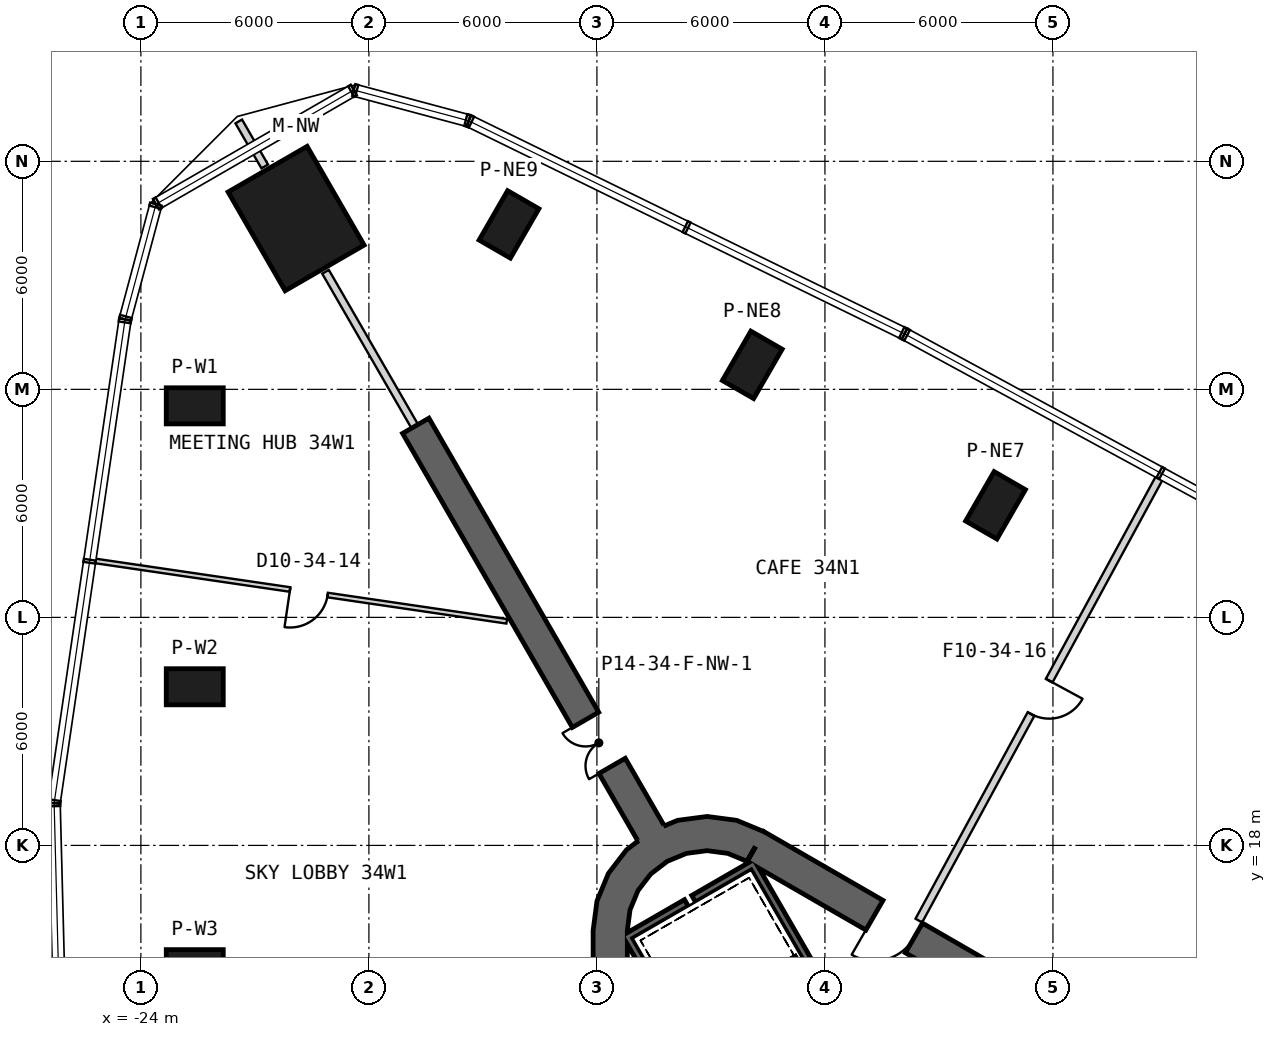
"""IFC4 building model, lengths in metres.
Left out: names, types, materials, properties, quantities, classifications, styles, units other than length and angle.
Written with IfcOpenShell. Run it as: python <this file> out.ifc"""

import sys

from ifc_helpers import new_model, si_unit, direction, frame, frame_2d, origin, origin_2d, place, context, subcontext, project, spatial, polyline, rectangle, outline, extrude, element, fill, save


model = new_model("IFC4")
c1 = context("Model", 3, precision=1e-05, world=origin(), true_north=direction((0.0, 1.0)))
c2 = subcontext(c1, "Body", "Model", "MODEL_VIEW")
j1 = project(units=[si_unit("LENGTHUNIT", "METRE"), si_unit("PLANEANGLEUNIT", "RADIAN")], contexts=[c1])
p1 = place(None, origin())
s1 = spatial("IfcSite", under=j1, at=p1, CompositionType="ELEMENT")
p2 = place(p1, origin())
s2 = spatial("IfcBuilding", under=s1, at=p2, CompositionType="ELEMENT")
p3 = place(p2, frame((0.0, 0.0, 156.2)))
s3 = spatial("IfcBuildingStorey", under=s2, at=p3, CompositionType="ELEMENT", Elevation=156.2)
p4 = place(p3, frame((-19.915, 34.494, 0.0), z_axis=(0.0, 0.0, 1.0), x_axis=(-0.5, 0.866025403784, 0.0)))
e1 = element("IfcColumn", 1, at=p4, inside=s3, PredefinedType="COLUMN", context=c2, shape_type="SweptSolid", body=[
    extrude(rectangle(XDim=3.0, YDim=2.4, at=origin_2d()), origin(), (0.0, 0.0, 1.0), 7.0),
])
for number, where, z_axis, x_axis in (
    (2, (-22.583, 29.566, 0.0), (0.0, 0.0, 1.0), (-1.0, 0.0, 0.0)),
    (3, (-22.583, 22.174, 0.0), (0.0, 0.0, 1.0), (-1.0, 0.0, 0.0)),
    (4, (-22.583, 14.783, 0.0), (0.0, 0.0, 1.0), (-1.0, 0.0, 0.0)),
    (5, (-1.511, 26.948, 0.0), (0.0, 0.0, 1.0), (0.5, 0.866, 0.0)),
    (6, (-7.912, 30.644, 0.0), (0.0, 0.0, 1.0), (0.5, 0.866, 0.0)),
    (7, (-14.313, 34.34, 0.0), (0.0, 0.0, 1.0), (0.5, 0.866, 0.0)),
):
    element("IfcColumn", number, at=place(p3, frame(where, z_axis=z_axis, x_axis=x_axis)), inside=s3, PredefinedType="COLUMN", context=c2, shape_type="SweptSolid", body=[
        extrude(rectangle(XDim=1.5, YDim=0.95, at=origin_2d()), origin(), (0.0, 0.0, 1.0), 7.0),
    ])
p5 = place(p3, frame((19.475, 2.208, 0.0), z_axis=(0.0, 0.0, 1.0), x_axis=(-0.866028369851, 0.499994862586, 0.0)))
e8 = element("IfcWall", 8, at=p5, inside=s3, PredefinedType="SHEAR", context=c2, shape_type="SweptSolid", body=[
    extrude(rectangle(XDim=31.523, YDim=0.9, at=frame_2d((15.762, 0.0))), origin(), (0.0, 0.0, 1.0), 7.0),
])
p6 = place(p5, frame((7.062, 0.0, 0.0)))
e9 = element("IfcOpeningElement", 9, at=p6, cuts=e8, PredefinedType="OPENING", context=c2, shape_type="SweptSolid", body=[
    extrude(rectangle(XDim=1.2, YDim=2.4, at=frame_2d((0.6, 1.2))), frame((0.0, 0.46, 0.0), z_axis=(0.0, -1.0, 0.0), x_axis=(1.0, 0.0, 0.0)), (0.0, 0.0, 1.0), 0.92),
])
p7 = place(p5, frame((15.162, 0.0, 0.0)))
e10 = element("IfcOpeningElement", 10, at=p7, cuts=e8, PredefinedType="OPENING", context=c2, shape_type="SweptSolid", body=[
    extrude(rectangle(XDim=1.2, YDim=2.4, at=frame_2d((0.6, 1.2))), frame((0.0, 0.46, 0.0), z_axis=(0.0, -1.0, 0.0), x_axis=(1.0, 0.0, 0.0)), (0.0, 0.0, 1.0), 0.92),
])
p8 = place(p5, frame((17.862, 0.0, 0.0)))
e11 = element("IfcOpeningElement", 11, at=p8, cuts=e8, PredefinedType="OPENING", context=c2, shape_type="SweptSolid", body=[
    extrude(rectangle(XDim=1.2, YDim=2.4, at=frame_2d((0.6, 1.2))), frame((0.0, 0.46, 0.0), z_axis=(0.0, -1.0, 0.0), x_axis=(1.0, 0.0, 0.0)), (0.0, 0.0, 1.0), 0.92),
])
p9 = place(p5, frame((20.562, 0.0, 0.0)))
e12 = element("IfcOpeningElement", 12, at=p9, cuts=e8, PredefinedType="OPENING", context=c2, shape_type="SweptSolid", body=[
    extrude(rectangle(XDim=1.2, YDim=2.4, at=frame_2d((0.6, 1.2))), frame((0.0, 0.46, 0.0), z_axis=(0.0, -1.0, 0.0), x_axis=(1.0, 0.0, 0.0)), (0.0, 0.0, 1.0), 0.92),
])
p10 = place(p5, frame((23.262, 0.0, 0.0)))
e13 = element("IfcOpeningElement", 13, at=p10, cuts=e8, PredefinedType="OPENING", context=c2, shape_type="SweptSolid", body=[
    extrude(rectangle(XDim=1.2, YDim=2.4, at=frame_2d((0.6, 1.2))), frame((0.0, 0.46, 0.0), z_axis=(0.0, -1.0, 0.0), x_axis=(1.0, 0.0, 0.0)), (0.0, 0.0, 1.0), 0.92),
])
p11 = place(p5, frame((3.612, 0.0, 0.0)))
e14 = element("IfcOpeningElement", 14, at=p11, cuts=e8, PredefinedType="OPENING", context=c2, shape_type="SweptSolid", body=[
    extrude(rectangle(XDim=1.2, YDim=2.4, at=frame_2d((0.6, 1.2))), frame((0.0, 0.46, 0.0), z_axis=(0.0, -1.0, 0.0), x_axis=(1.0, 0.0, 0.0)), (0.0, 0.0, 1.0), 0.92),
])
p12 = place(p5, frame((26.712, 0.0, 0.0)))
e15 = element("IfcOpeningElement", 15, at=p12, cuts=e8, PredefinedType="OPENING", context=c2, shape_type="SweptSolid", body=[
    extrude(rectangle(XDim=1.2, YDim=2.4, at=frame_2d((0.6, 1.2))), frame((0.0, 0.46, 0.0), z_axis=(0.0, -1.0, 0.0), x_axis=(1.0, 0.0, 0.0)), (0.0, 0.0, 1.0), 0.92),
])
p13 = place(p3, frame((-11.65, 15.762, 0.0), z_axis=(0.0, 0.0, 1.0), x_axis=(0.0, -1.0, 0.0)))
e16 = element("IfcWall", 16, at=p13, inside=s3, PredefinedType="SHEAR", context=c2, shape_type="SweptSolid", body=[
    extrude(rectangle(XDim=31.523, YDim=0.9, at=frame_2d((15.762, 0.0))), origin(), (0.0, 0.0, 1.0), 7.0),
])
p14 = place(p13, frame((7.062, 0.0, 0.0)))
e17 = element("IfcOpeningElement", 17, at=p14, cuts=e16, PredefinedType="OPENING", context=c2, shape_type="SweptSolid", body=[
    extrude(rectangle(XDim=1.2, YDim=2.4, at=frame_2d((0.6, 1.2))), frame((0.0, 0.46, 0.0), z_axis=(0.0, -1.0, 0.0), x_axis=(1.0, 0.0, 0.0)), (0.0, 0.0, 1.0), 0.92),
])
p15 = place(p13, frame((9.762, 0.0, 0.0)))
e18 = element("IfcOpeningElement", 18, at=p15, cuts=e16, PredefinedType="OPENING", context=c2, shape_type="SweptSolid", body=[
    extrude(rectangle(XDim=1.2, YDim=2.4, at=frame_2d((0.6, 1.2))), frame((0.0, 0.46, 0.0), z_axis=(0.0, -1.0, 0.0), x_axis=(1.0, 0.0, 0.0)), (0.0, 0.0, 1.0), 0.92),
])
p16 = place(p13, frame((12.462, 0.0, 0.0)))
e19 = element("IfcOpeningElement", 19, at=p16, cuts=e16, PredefinedType="OPENING", context=c2, shape_type="SweptSolid", body=[
    extrude(rectangle(XDim=1.2, YDim=2.4, at=frame_2d((0.6, 1.2))), frame((0.0, 0.46, 0.0), z_axis=(0.0, -1.0, 0.0), x_axis=(1.0, 0.0, 0.0)), (0.0, 0.0, 1.0), 0.92),
])
p17 = place(p13, frame((15.162, 0.0, 0.0)))
e20 = element("IfcOpeningElement", 20, at=p17, cuts=e16, PredefinedType="OPENING", context=c2, shape_type="SweptSolid", body=[
    extrude(rectangle(XDim=1.2, YDim=2.4, at=frame_2d((0.6, 1.2))), frame((0.0, 0.46, 0.0), z_axis=(0.0, -1.0, 0.0), x_axis=(1.0, 0.0, 0.0)), (0.0, 0.0, 1.0), 0.92),
])
p18 = place(p13, frame((17.862, 0.0, 0.0)))
e21 = element("IfcOpeningElement", 21, at=p18, cuts=e16, PredefinedType="OPENING", context=c2, shape_type="SweptSolid", body=[
    extrude(rectangle(XDim=1.2, YDim=2.4, at=frame_2d((0.6, 1.2))), frame((0.0, 0.46, 0.0), z_axis=(0.0, -1.0, 0.0), x_axis=(1.0, 0.0, 0.0)), (0.0, 0.0, 1.0), 0.92),
])
p19 = place(p13, frame((20.562, 0.0, 0.0)))
e22 = element("IfcOpeningElement", 22, at=p19, cuts=e16, PredefinedType="OPENING", context=c2, shape_type="SweptSolid", body=[
    extrude(rectangle(XDim=1.2, YDim=2.4, at=frame_2d((0.6, 1.2))), frame((0.0, 0.46, 0.0), z_axis=(0.0, -1.0, 0.0), x_axis=(1.0, 0.0, 0.0)), (0.0, 0.0, 1.0), 0.92),
])
p20 = place(p13, frame((23.262, 0.0, 0.0)))
e23 = element("IfcOpeningElement", 23, at=p20, cuts=e16, PredefinedType="OPENING", context=c2, shape_type="SweptSolid", body=[
    extrude(rectangle(XDim=1.2, YDim=2.4, at=frame_2d((0.6, 1.2))), frame((0.0, 0.46, 0.0), z_axis=(0.0, -1.0, 0.0), x_axis=(1.0, 0.0, 0.0)), (0.0, 0.0, 1.0), 0.92),
])
p21 = place(p13, frame((3.612, 0.0, 0.0)))
e24 = element("IfcOpeningElement", 24, at=p21, cuts=e16, PredefinedType="OPENING", context=c2, shape_type="SweptSolid", body=[
    extrude(rectangle(XDim=1.2, YDim=2.4, at=frame_2d((0.6, 1.2))), frame((0.0, 0.46, 0.0), z_axis=(0.0, -1.0, 0.0), x_axis=(1.0, 0.0, 0.0)), (0.0, 0.0, 1.0), 0.92),
])
p22 = place(p13, frame((26.712, 0.0, 0.0)))
e25 = element("IfcOpeningElement", 25, at=p22, cuts=e16, PredefinedType="OPENING", context=c2, shape_type="SweptSolid", body=[
    extrude(rectangle(XDim=1.2, YDim=2.4, at=frame_2d((0.6, 1.2))), frame((0.0, 0.46, 0.0), z_axis=(0.0, -1.0, 0.0), x_axis=(1.0, 0.0, 0.0)), (0.0, 0.0, 1.0), 0.92),
])
p23 = place(p3, origin())
e26 = element("IfcWall", 26, at=p23, inside=s3, PredefinedType="SHEAR", context=c2, shape_type="SweptSolid", body=[
    extrude(outline(polyline([(-7.6, 18.36), (-8.323, 18.659), (-9.1, 18.762), (-9.876, 18.659), (-10.6, 18.36), (-11.221, 17.883), (-11.698, 17.262), (-11.998, 16.538), (-12.1, 15.762), (-11.2, 15.762), (-11.128, 16.305), (-10.919, 16.812), (-10.585, 17.247), (-10.15, 17.58), (-9.644, 17.79), (-9.1, 17.862), (-8.556, 17.79), (-8.05, 17.58), (-7.6, 18.36)])), origin(), (0.0, 0.0, 1.0), 7.0),
])
p24 = place(p3, frame((-10.575, 18.316, 0.0), z_axis=(0.0, 0.0, 1.0), x_axis=(-0.500002326941, 0.86602406032, 0.0)))
e27 = element("IfcWall", 27, at=p24, inside=s3, PredefinedType="SHEAR", context=c2, shape_type="SweptSolid", body=[
    extrude(rectangle(XDim=12.384, YDim=0.8, at=frame_2d((6.192, 0.0))), origin(), (0.0, 0.0, 1.0), 7.0),
])
p25 = place(p24, frame((2.05, 0.0, 0.0)))
e28 = element("IfcOpeningElement", 28, at=p25, cuts=e27, PredefinedType="OPENING", context=c2, shape_type="SweptSolid", body=[
    extrude(rectangle(XDim=1.4, YDim=2.4, at=frame_2d((0.7, 1.2))), frame((0.0, 0.41, 0.0), z_axis=(0.0, -1.0, 0.0), x_axis=(1.0, 0.0, 0.0)), (0.0, 0.0, 1.0), 0.82),
])
p26 = place(p3, frame((-11.245, 15.678, -0.35), z_axis=(0.0, 0.0, 1.0), x_axis=(0.499977274689, -0.866038523851, 0.0)))
e29 = element("IfcWall", 29, at=p26, inside=s3, PredefinedType="SHEAR", context=c2, shape_type="SweptSolid", body=[
    extrude(rectangle(XDim=8.1, YDim=0.2, at=frame_2d((4.05, 0.0))), origin(), (0.0, 0.0, 1.0), 7.0),
])
p27 = place(p3, frame((-7.818, 17.541, -0.35), z_axis=(0.0, 0.0, 1.0), x_axis=(-0.866088799389, -0.499890179513, 0.0)))
e30 = element("IfcWall", 30, at=p27, inside=s3, PredefinedType="SHEAR", context=c2, shape_type="SweptSolid", body=[
    extrude(rectangle(XDim=1.89, YDim=0.2, at=frame_2d((0.945, 0.0))), origin(), (0.0, 0.0, 1.0), 7.0),
])
p28 = place(p3, frame((-9.645, 16.486, -0.35), z_axis=(0.0, 0.0, 1.0), x_axis=(-0.866038843867, -0.499976720371, 0.0)))
e31 = element("IfcWall", 31, at=p28, inside=s3, PredefinedType="SHEAR", context=c2, shape_type="SweptSolid", body=[
    extrude(rectangle(XDim=1.69, YDim=0.2, at=frame_2d((0.845, 0.0))), origin(), (0.0, 0.0, 1.0), 7.0),
])
p29 = place(p3, frame((-7.854, 17.405, -0.35), z_axis=(0.0, 0.0, 1.0), x_axis=(0.499997992926, -0.866026562566, 0.0)))
e32 = element("IfcWall", 32, at=p29, inside=s3, PredefinedType="SHEAR", context=c2, shape_type="SweptSolid", body=[
    extrude(rectangle(XDim=7.9, YDim=0.2, at=frame_2d((3.95, 0.0))), origin(), (0.0, 0.0, 1.0), 7.0),
])
p30 = place(p3, frame((-14.374, 23.896, 0.0), z_axis=(0.0, 0.0, 1.0), x_axis=(-0.98939741422, 0.145233455974, 0.0)))
e33 = element("IfcWall", 33, at=p30, inside=s3, PredefinedType="PARTITIONING", context=c2, shape_type="SweptSolid", body=[
    extrude(rectangle(XDim=11.088, YDim=0.12, at=frame_2d((5.544, 0.0))), origin(), (0.0, 0.0, 1.0), 5.612),
])
p31 = place(p30, frame((4.762, 0.0, 0.0)))
e34 = element("IfcOpeningElement", 34, at=p31, cuts=e33, PredefinedType="OPENING", context=c2, shape_type="SweptSolid", body=[
    extrude(rectangle(XDim=1.0, YDim=2.1, at=frame_2d((0.5, 1.05))), frame((0.0, 0.07, 0.0), z_axis=(0.0, -1.0, 0.0), x_axis=(1.0, 0.0, 0.0)), (0.0, 0.0, 1.0), 0.14),
])
p32 = place(p3, frame((-21.425, 37.049, 0.0), z_axis=(0.0, 0.0, 1.0), x_axis=(0.499959369124, -0.866048860761, 0.0)))
e35 = element("IfcWall", 35, at=p32, inside=s3, PredefinedType="PARTITIONING", context=c2, shape_type="SweptSolid", body=[
    extrude(rectangle(XDim=1.368, YDim=0.2, at=frame_2d((0.684, 0.0))), origin(), (0.0, 0.0, 1.0), 6.65),
])
p33 = place(p3, frame((-19.141, 33.093, 0.0), z_axis=(0.0, 0.0, 1.0), x_axis=(0.500035941397, -0.866004652015, 0.0)))
e36 = element("IfcWall", 36, at=p33, inside=s3, PredefinedType="PARTITIONING", context=c2, shape_type="SweptSolid", body=[
    extrude(rectangle(XDim=4.697, YDim=0.2, at=frame_2d((2.348, 0.0))), origin(), (0.0, 0.0, 1.0), 6.13),
])
p34 = place(p3, frame((2.86, 27.783, 0.0), z_axis=(0.0, 0.0, 1.0), x_axis=(-0.477390666412, -0.87869115827, 0.0)))
e37 = element("IfcWall", 37, at=p34, inside=s3, PredefinedType="PARTITIONING", context=c2, shape_type="SweptSolid", body=[
    extrude(rectangle(XDim=13.396, YDim=0.2, at=frame_2d((6.698, 0.0))), origin(), (0.0, 0.0, 1.0), 5.612),
])
p35 = place(p34, frame((6.2, 0.0, 0.0)))
e38 = element("IfcOpeningElement", 38, at=p35, cuts=e37, PredefinedType="OPENING", context=c2, shape_type="SweptSolid", body=[
    extrude(rectangle(XDim=1.0, YDim=2.1, at=frame_2d((0.5, 1.05))), frame((0.0, 0.11, 0.0), z_axis=(0.0, -1.0, 0.0), x_axis=(1.0, 0.0, 0.0)), (0.0, 0.0, 1.0), 0.22),
])
p36 = place(p31, origin())
e39 = element("IfcDoor", 39, at=p36, inside=s3, OperationType="SINGLE_SWING_RIGHT", PredefinedType="NOTDEFINED", context=c2, shape_type="SweptSolid", body=[
    extrude(rectangle(XDim=1.0, YDim=2.1, at=frame_2d((0.5, 1.05))), frame((0.0, 0.025, 0.0), z_axis=(0.0, -1.0, 0.0), x_axis=(1.0, 0.0, 0.0)), (0.0, 0.0, 1.0), 0.05),
])
fill(e34, e39)
p37 = place(p35, origin())
e40 = element("IfcDoor", 40, at=p37, inside=s3, OperationType="SINGLE_SWING_LEFT", PredefinedType="USERDEFINED", context=c2, shape_type="SweptSolid", body=[
    extrude(rectangle(XDim=1.0, YDim=2.1, at=frame_2d((0.5, 1.05))), frame((0.0, 0.025, 0.0), z_axis=(0.0, -1.0, 0.0), x_axis=(1.0, 0.0, 0.0)), (0.0, 0.0, 1.0), 0.05),
])
fill(e38, e40)
p38 = place(p12, origin())
e41 = element("IfcDoor", 41, at=p38, inside=s3, OperationType="SINGLE_SWING_RIGHT", PredefinedType="USERDEFINED", context=c2, shape_type="SweptSolid", body=[
    extrude(rectangle(XDim=1.2, YDim=2.4, at=frame_2d((0.6, 1.2))), frame((0.0, 0.025, 0.0), z_axis=(0.0, -1.0, 0.0), x_axis=(1.0, 0.0, 0.0)), (0.0, 0.0, 1.0), 0.05),
])
fill(e15, e41)
p39 = place(p25, origin())
e42 = element("IfcDoor", 42, at=p39, inside=s3, OperationType="DOUBLE_DOOR_SINGLE_SWING", PredefinedType="NOTDEFINED", context=c2, shape_type="SweptSolid", body=[
    extrude(rectangle(XDim=1.4, YDim=2.4, at=frame_2d((0.7, 1.2))), frame((0.0, 0.025, 0.0), z_axis=(0.0, -1.0, 0.0), x_axis=(1.0, 0.0, 0.0)), (0.0, 0.0, 1.0), 0.05),
])
fill(e28, e42)
save(model, sys.argv[1])
